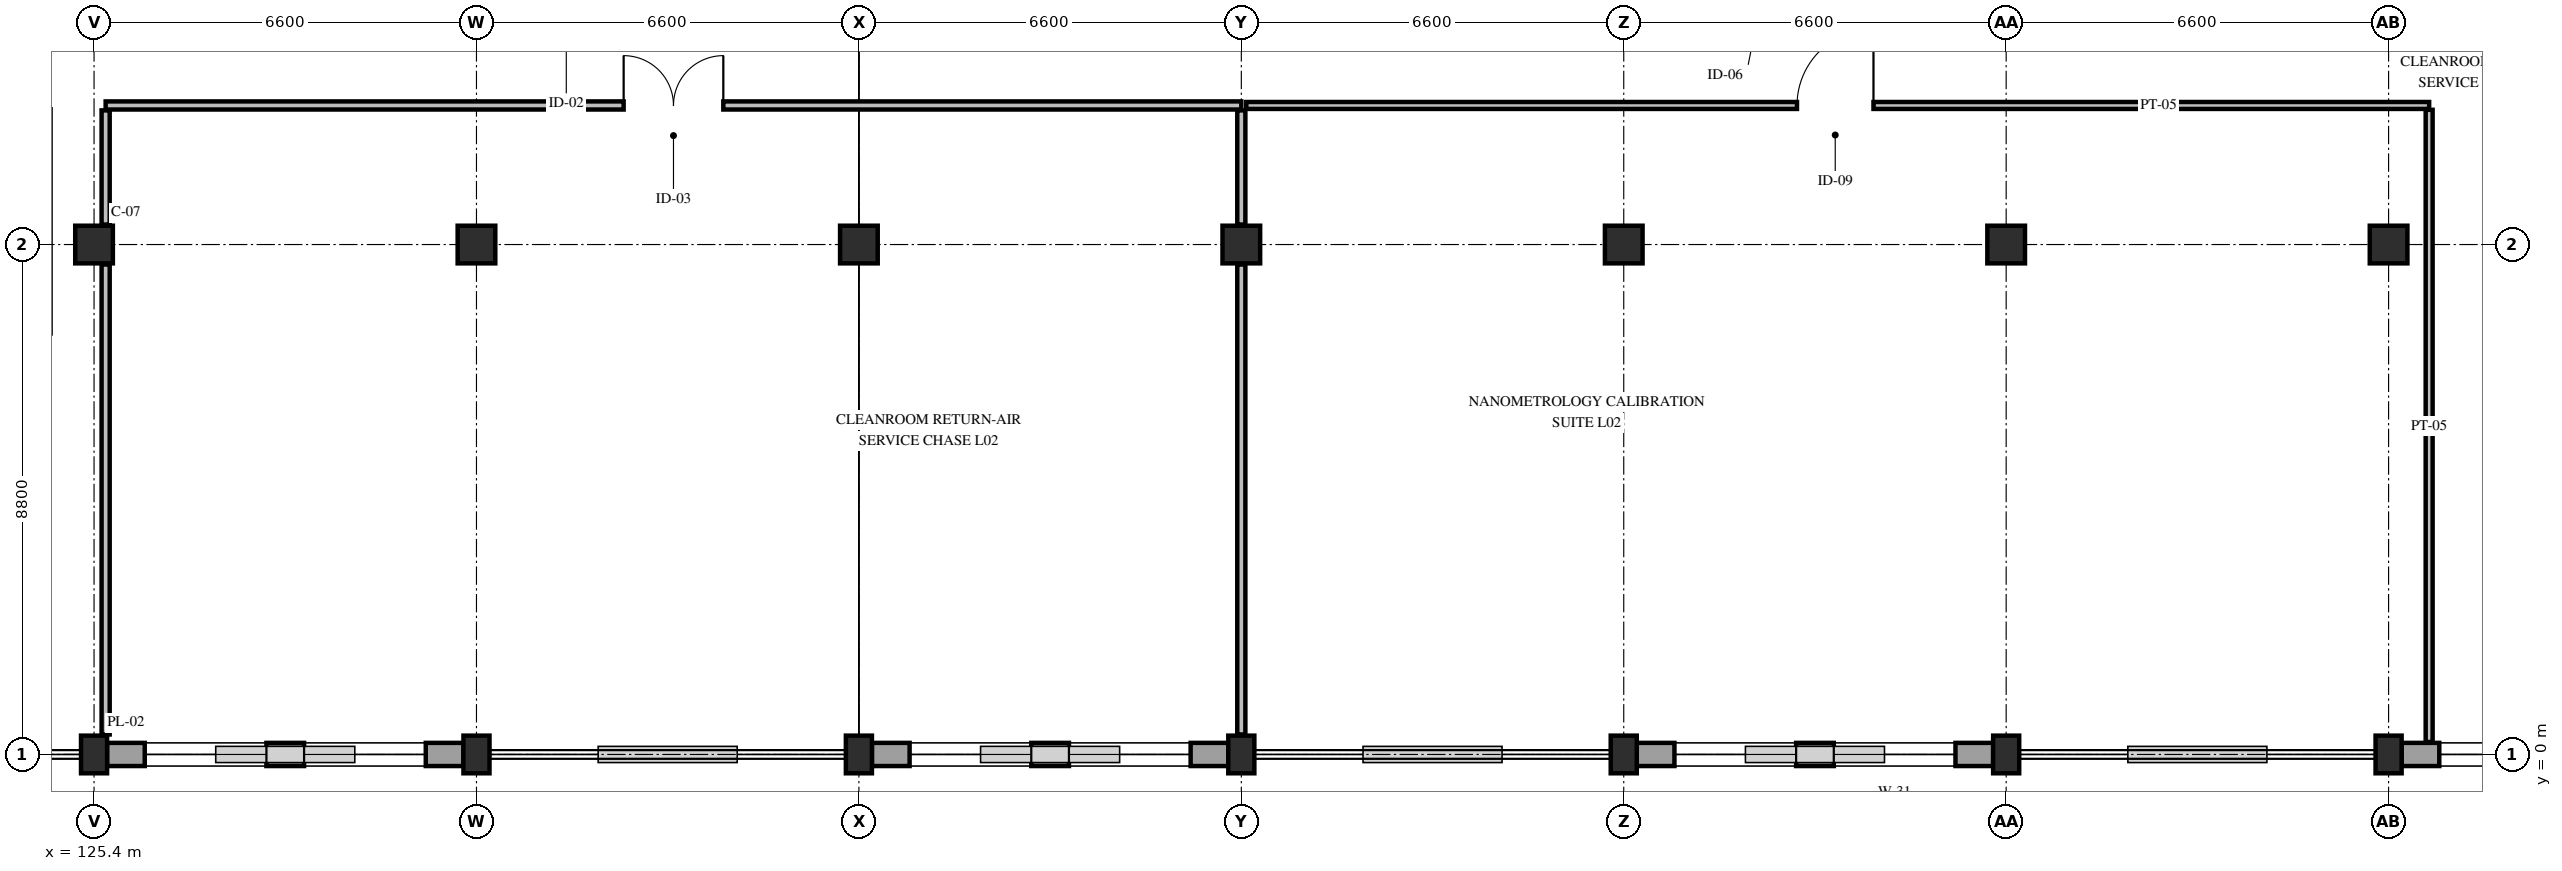
"""IFC4 building model, lengths in metres.
Left out: names, types, materials, properties, quantities, classifications, styles, units other than length and angle.
Written with IfcOpenShell. Run it as: python <this file> out.ifc"""

import sys

from ifc_helpers import new_model, si_unit, direction, frame, frame_2d, origin, origin_2d, place, context, subcontext, project, spatial, rectangle, extrude, element, fill, save


model = new_model("IFC4")
c1 = context("Model", 3, precision=1e-05, world=origin(), true_north=direction((0.0, 1.0)))
c2 = subcontext(c1, "Body", "Model", "MODEL_VIEW")
j1 = project(units=[si_unit("LENGTHUNIT", "METRE"), si_unit("PLANEANGLEUNIT", "RADIAN")], contexts=[c1])
p1 = place(None, origin())
s1 = spatial("IfcSite", under=j1, at=p1, CompositionType="ELEMENT")
p2 = place(p1, origin())
s2 = spatial("IfcBuilding", under=s1, at=p2, CompositionType="ELEMENT")
p3 = place(p2, frame((0.0, 0.0, 10.2)))
s3 = spatial("IfcBuildingStorey", under=s2, at=p3, CompositionType="ELEMENT", Elevation=10.2)
p4 = place(p3, frame((125.4, 0.0, 0.0), z_axis=(0.0, 0.0, 1.0), x_axis=(1.0, 0.0, 0.0)))
e1 = element("IfcColumn", 1, at=p4, inside=s3, PredefinedType="PILASTER", context=c2, shape_type="SweptSolid", body=[
    extrude(rectangle(XDim=0.45, YDim=0.65, at=origin_2d()), origin(), (0.0, 0.0, 1.0), 4.8),
])
p5 = place(p3, frame((125.4, 8.8, 0.0), z_axis=(0.0, 0.0, 1.0), x_axis=(1.0, 0.0, 0.0)))
e2 = element("IfcColumn", 2, at=p5, inside=s3, PredefinedType="COLUMN", context=c2, shape_type="SweptSolid", body=[
    extrude(rectangle(XDim=0.65, YDim=0.65, at=origin_2d()), origin(), (0.0, 0.0, 1.0), 4.8),
])
p6 = place(p3, frame((132.0, 0.0, 0.0), z_axis=(0.0, 0.0, 1.0), x_axis=(1.0, 0.0, 0.0)))
e3 = element("IfcColumn", 3, at=p6, inside=s3, PredefinedType="PILASTER", context=c2, shape_type="SweptSolid", body=[
    extrude(rectangle(XDim=0.45, YDim=0.65, at=origin_2d()), origin(), (0.0, 0.0, 1.0), 4.8),
])
p7 = place(p3, frame((132.0, 8.8, 0.0), z_axis=(0.0, 0.0, 1.0), x_axis=(1.0, 0.0, 0.0)))
e4 = element("IfcColumn", 4, at=p7, inside=s3, PredefinedType="COLUMN", context=c2, shape_type="SweptSolid", body=[
    extrude(rectangle(XDim=0.65, YDim=0.65, at=origin_2d()), origin(), (0.0, 0.0, 1.0), 4.8),
])
p8 = place(p3, frame((138.6, 0.0, 0.0), z_axis=(0.0, 0.0, 1.0), x_axis=(1.0, 0.0, 0.0)))
e5 = element("IfcColumn", 5, at=p8, inside=s3, PredefinedType="PILASTER", context=c2, shape_type="SweptSolid", body=[
    extrude(rectangle(XDim=0.45, YDim=0.65, at=origin_2d()), origin(), (0.0, 0.0, 1.0), 4.8),
])
p9 = place(p3, frame((138.6, 8.8, 0.0), z_axis=(0.0, 0.0, 1.0), x_axis=(1.0, 0.0, 0.0)))
e6 = element("IfcColumn", 6, at=p9, inside=s3, PredefinedType="COLUMN", context=c2, shape_type="SweptSolid", body=[
    extrude(rectangle(XDim=0.65, YDim=0.65, at=origin_2d()), origin(), (0.0, 0.0, 1.0), 4.8),
])
p10 = place(p3, frame((145.2, 0.0, 0.0), z_axis=(0.0, 0.0, 1.0), x_axis=(1.0, 0.0, 0.0)))
e7 = element("IfcColumn", 7, at=p10, inside=s3, PredefinedType="PILASTER", context=c2, shape_type="SweptSolid", body=[
    extrude(rectangle(XDim=0.45, YDim=0.65, at=origin_2d()), origin(), (0.0, 0.0, 1.0), 4.8),
])
p11 = place(p3, frame((145.2, 8.8, 0.0), z_axis=(0.0, 0.0, 1.0), x_axis=(1.0, 0.0, 0.0)))
e8 = element("IfcColumn", 8, at=p11, inside=s3, PredefinedType="COLUMN", context=c2, shape_type="SweptSolid", body=[
    extrude(rectangle(XDim=0.65, YDim=0.65, at=origin_2d()), origin(), (0.0, 0.0, 1.0), 4.8),
])
p12 = place(p3, frame((151.8, 0.0, 0.0), z_axis=(0.0, 0.0, 1.0), x_axis=(1.0, 0.0, 0.0)))
e9 = element("IfcColumn", 9, at=p12, inside=s3, PredefinedType="PILASTER", context=c2, shape_type="SweptSolid", body=[
    extrude(rectangle(XDim=0.45, YDim=0.65, at=origin_2d()), origin(), (0.0, 0.0, 1.0), 4.8),
])
p13 = place(p3, frame((151.8, 8.8, 0.0), z_axis=(0.0, 0.0, 1.0), x_axis=(1.0, 0.0, 0.0)))
e10 = element("IfcColumn", 10, at=p13, inside=s3, PredefinedType="COLUMN", context=c2, shape_type="SweptSolid", body=[
    extrude(rectangle(XDim=0.65, YDim=0.65, at=origin_2d()), origin(), (0.0, 0.0, 1.0), 4.8),
])
p14 = place(p3, frame((158.4, 0.0, 0.0), z_axis=(0.0, 0.0, 1.0), x_axis=(1.0, 0.0, 0.0)))
e11 = element("IfcColumn", 11, at=p14, inside=s3, PredefinedType="PILASTER", context=c2, shape_type="SweptSolid", body=[
    extrude(rectangle(XDim=0.45, YDim=0.65, at=origin_2d()), origin(), (0.0, 0.0, 1.0), 4.8),
])
p15 = place(p3, frame((158.4, 8.8, 0.0), z_axis=(0.0, 0.0, 1.0), x_axis=(1.0, 0.0, 0.0)))
e12 = element("IfcColumn", 12, at=p15, inside=s3, PredefinedType="COLUMN", context=c2, shape_type="SweptSolid", body=[
    extrude(rectangle(XDim=0.65, YDim=0.65, at=origin_2d()), origin(), (0.0, 0.0, 1.0), 4.8),
])
p16 = place(p3, frame((165.0, 0.0, 0.0), z_axis=(0.0, 0.0, 1.0), x_axis=(1.0, 0.0, 0.0)))
e13 = element("IfcColumn", 13, at=p16, inside=s3, PredefinedType="PILASTER", context=c2, shape_type="SweptSolid", body=[
    extrude(rectangle(XDim=0.45, YDim=0.65, at=origin_2d()), origin(), (0.0, 0.0, 1.0), 4.8),
])
p17 = place(p3, frame((165.0, 8.8, 0.0), z_axis=(0.0, 0.0, 1.0), x_axis=(1.0, 0.0, 0.0)))
e14 = element("IfcColumn", 14, at=p17, inside=s3, PredefinedType="COLUMN", context=c2, shape_type="SweptSolid", body=[
    extrude(rectangle(XDim=0.65, YDim=0.65, at=origin_2d()), origin(), (0.0, 0.0, 1.0), 4.8),
])
p18 = place(p3, frame((171.375, 0.0, 0.0), z_axis=(0.0, 0.0, 1.0), x_axis=(-1.0, 0.0, 0.0)))
e15 = element("IfcWall", 15, at=p18, inside=s3, PredefinedType="STANDARD", context=c2, shape_type="SweptSolid", body=[
    extrude(rectangle(XDim=6.15, YDim=0.4, at=frame_2d((3.075, 0.0))), origin(), (0.0, 0.0, 1.0), 3.98),
])
p19 = place(p18, frame((0.65, 0.0, 0.85)))
e16 = element("IfcOpeningElement", 16, at=p19, cuts=e15, PredefinedType="OPENING", context=c2, shape_type="SweptSolid", body=[
    extrude(rectangle(XDim=2.1, YDim=2.04, at=frame_2d((1.05, 1.02))), frame((0.0, 0.215, 0.0), z_axis=(0.0, -1.0, 0.0), x_axis=(1.0, 0.0, 0.0)), (0.0, 0.0, 1.0), 0.43),
])
p20 = place(p18, frame((3.4, 0.0, 0.85)))
e17 = element("IfcOpeningElement", 17, at=p20, cuts=e15, PredefinedType="OPENING", context=c2, shape_type="SweptSolid", body=[
    extrude(rectangle(XDim=2.1, YDim=2.04, at=frame_2d((1.05, 1.02))), frame((0.0, 0.215, 0.0), z_axis=(0.0, -1.0, 0.0), x_axis=(1.0, 0.0, 0.0)), (0.0, 0.0, 1.0), 0.43),
])
p21 = place(p3, frame((158.175, 0.0, 0.0), z_axis=(0.0, 0.0, 1.0), x_axis=(-1.0, 0.0, 0.0)))
e18 = element("IfcWall", 18, at=p21, inside=s3, PredefinedType="STANDARD", context=c2, shape_type="SweptSolid", body=[
    extrude(rectangle(XDim=6.15, YDim=0.4, at=frame_2d((3.075, 0.0))), origin(), (0.0, 0.0, 1.0), 3.98),
])
p22 = place(p21, frame((0.65, 0.0, 0.85)))
e19 = element("IfcOpeningElement", 19, at=p22, cuts=e18, PredefinedType="OPENING", context=c2, shape_type="SweptSolid", body=[
    extrude(rectangle(XDim=2.1, YDim=2.04, at=frame_2d((1.05, 1.02))), frame((0.0, 0.215, 0.0), z_axis=(0.0, -1.0, 0.0), x_axis=(1.0, 0.0, 0.0)), (0.0, 0.0, 1.0), 0.43),
])
p23 = place(p21, frame((3.4, 0.0, 0.85)))
e20 = element("IfcOpeningElement", 20, at=p23, cuts=e18, PredefinedType="OPENING", context=c2, shape_type="SweptSolid", body=[
    extrude(rectangle(XDim=2.1, YDim=2.04, at=frame_2d((1.05, 1.02))), frame((0.0, 0.215, 0.0), z_axis=(0.0, -1.0, 0.0), x_axis=(1.0, 0.0, 0.0)), (0.0, 0.0, 1.0), 0.43),
])
p24 = place(p3, frame((144.975, 0.0, 0.0), z_axis=(0.0, 0.0, 1.0), x_axis=(-1.0, 0.0, 0.0)))
e21 = element("IfcWall", 21, at=p24, inside=s3, PredefinedType="STANDARD", context=c2, shape_type="SweptSolid", body=[
    extrude(rectangle(XDim=6.15, YDim=0.4, at=frame_2d((3.075, 0.0))), origin(), (0.0, 0.0, 1.0), 3.98),
])
p25 = place(p24, frame((0.65, 0.0, 0.85)))
e22 = element("IfcOpeningElement", 22, at=p25, cuts=e21, PredefinedType="OPENING", context=c2, shape_type="SweptSolid", body=[
    extrude(rectangle(XDim=2.1, YDim=2.04, at=frame_2d((1.05, 1.02))), frame((0.0, 0.215, 0.0), z_axis=(0.0, -1.0, 0.0), x_axis=(1.0, 0.0, 0.0)), (0.0, 0.0, 1.0), 0.43),
])
p26 = place(p24, frame((3.4, 0.0, 0.85)))
e23 = element("IfcOpeningElement", 23, at=p26, cuts=e21, PredefinedType="OPENING", context=c2, shape_type="SweptSolid", body=[
    extrude(rectangle(XDim=2.1, YDim=2.04, at=frame_2d((1.05, 1.02))), frame((0.0, 0.215, 0.0), z_axis=(0.0, -1.0, 0.0), x_axis=(1.0, 0.0, 0.0)), (0.0, 0.0, 1.0), 0.43),
])
p27 = place(p3, frame((131.775, 0.0, 0.0), z_axis=(0.0, 0.0, 1.0), x_axis=(-1.0, 0.0, 0.0)))
e24 = element("IfcWall", 24, at=p27, inside=s3, PredefinedType="STANDARD", context=c2, shape_type="SweptSolid", body=[
    extrude(rectangle(XDim=6.15, YDim=0.4, at=frame_2d((3.075, 0.0))), origin(), (0.0, 0.0, 1.0), 3.98),
])
p28 = place(p27, frame((0.65, 0.0, 0.85)))
e25 = element("IfcOpeningElement", 25, at=p28, cuts=e24, PredefinedType="OPENING", context=c2, shape_type="SweptSolid", body=[
    extrude(rectangle(XDim=2.1, YDim=2.04, at=frame_2d((1.05, 1.02))), frame((0.0, 0.215, 0.0), z_axis=(0.0, -1.0, 0.0), x_axis=(1.0, 0.0, 0.0)), (0.0, 0.0, 1.0), 0.43),
])
p29 = place(p27, frame((3.4, 0.0, 0.85)))
e26 = element("IfcOpeningElement", 26, at=p29, cuts=e24, PredefinedType="OPENING", context=c2, shape_type="SweptSolid", body=[
    extrude(rectangle(XDim=2.1, YDim=2.04, at=frame_2d((1.05, 1.02))), frame((0.0, 0.215, 0.0), z_axis=(0.0, -1.0, 0.0), x_axis=(1.0, 0.0, 0.0)), (0.0, 0.0, 1.0), 0.43),
])
p30 = place(p3, frame((125.6, 11.2, 0.0), z_axis=(0.0, 0.0, 1.0), x_axis=(1.0, 0.0, 0.0)))
e27 = element("IfcWall", 27, at=p30, inside=s3, PredefinedType="PARTITIONING", context=c2, shape_type="SweptSolid", body=[
    extrude(rectangle(XDim=19.6, YDim=0.14, at=frame_2d((9.8, 0.0))), origin(), (0.0, 0.0, 1.0), 4.065),
])
p31 = place(p30, frame((8.94, 0.0, 0.0)))
e28 = element("IfcOpeningElement", 28, at=p31, cuts=e27, PredefinedType="OPENING", context=c2, shape_type="SweptSolid", body=[
    extrude(rectangle(XDim=1.72, YDim=2.35, at=frame_2d((0.86, 1.175))), frame((0.0, 0.085, 0.0), z_axis=(0.0, -1.0, 0.0), x_axis=(1.0, 0.0, 0.0)), (0.0, 0.0, 1.0), 0.17),
])
p32 = place(p3, frame((125.6, 0.345, 0.0), z_axis=(0.0, 0.0, 1.0), x_axis=(0.0, 1.0, 0.0)))
e29 = element("IfcWall", 29, at=p32, inside=s3, PredefinedType="PARTITIONING", context=c2, shape_type="SweptSolid", body=[
    extrude(rectangle(XDim=8.11, YDim=0.14, at=frame_2d((4.055, 0.0))), origin(), (0.0, 0.0, 1.0), 4.065),
])
p33 = place(p3, frame((125.6, 9.145, 0.0), z_axis=(0.0, 0.0, 1.0), x_axis=(0.0, 1.0, 0.0)))
e30 = element("IfcWall", 30, at=p33, inside=s3, PredefinedType="PARTITIONING", context=c2, shape_type="SweptSolid", body=[
    extrude(rectangle(XDim=1.97, YDim=0.14, at=frame_2d((0.985, 0.0))), origin(), (0.0, 0.0, 1.0), 4.065),
])
p34 = place(p3, frame((145.2, 0.345, 0.0), z_axis=(0.0, 0.0, 1.0), x_axis=(0.0, 1.0, 0.0)))
e31 = element("IfcWall", 31, at=p34, inside=s3, PredefinedType="PARTITIONING", context=c2, shape_type="SweptSolid", body=[
    extrude(rectangle(XDim=8.11, YDim=0.14, at=frame_2d((4.055, 0.0))), origin(), (0.0, 0.0, 1.0), 4.065),
])
p35 = place(p3, frame((145.2, 9.145, 0.0), z_axis=(0.0, 0.0, 1.0), x_axis=(0.0, 1.0, 0.0)))
e32 = element("IfcWall", 32, at=p35, inside=s3, PredefinedType="PARTITIONING", context=c2, shape_type="SweptSolid", body=[
    extrude(rectangle(XDim=1.97, YDim=0.14, at=frame_2d((0.985, 0.0))), origin(), (0.0, 0.0, 1.0), 4.065),
])
p36 = place(p3, frame((145.285, 11.2, 0.0), z_axis=(0.0, 0.0, 1.0), x_axis=(1.0, 0.0, 0.0)))
e33 = element("IfcWall", 33, at=p36, inside=s3, PredefinedType="PARTITIONING", context=c2, shape_type="SweptSolid", body=[
    extrude(rectangle(XDim=20.415, YDim=0.12, at=frame_2d((10.208, 0.0))), origin(), (0.0, 0.0, 1.0), 4.065),
])
p37 = place(p36, frame((9.505, 0.0, 0.0)))
e34 = element("IfcOpeningElement", 34, at=p37, cuts=e33, PredefinedType="OPENING", context=c2, shape_type="SweptSolid", body=[
    extrude(rectangle(XDim=1.32, YDim=2.2, at=frame_2d((0.66, 1.1))), frame((0.0, 0.075, 0.0), z_axis=(0.0, -1.0, 0.0), x_axis=(1.0, 0.0, 0.0)), (0.0, 0.0, 1.0), 0.15),
])
p38 = place(p3, frame((165.7, 0.215, 0.0), z_axis=(0.0, 0.0, 1.0), x_axis=(0.0, 1.0, 0.0)))
e35 = element("IfcWall", 35, at=p38, inside=s3, PredefinedType="PARTITIONING", context=c2, shape_type="SweptSolid", body=[
    extrude(rectangle(XDim=10.91, YDim=0.12, at=frame_2d((5.455, 0.0))), origin(), (0.0, 0.0, 1.0), 3.98),
])
p39 = place(p20, origin())
e36 = element("IfcWindow", 36, at=p39, inside=s3, PartitioningType="DOUBLE_PANEL_VERTICAL", PredefinedType="WINDOW", context=c2, shape_type="SweptSolid", body=[
    extrude(rectangle(XDim=2.1, YDim=2.04, at=frame_2d((1.05, 1.02))), frame((0.0, 0.03, 0.0), z_axis=(0.0, -1.0, 0.0), x_axis=(1.0, 0.0, 0.0)), (0.0, 0.0, 1.0), 0.06),
])
fill(e17, e36)
p40 = place(p22, origin())
e37 = element("IfcWindow", 37, at=p40, inside=s3, PartitioningType="DOUBLE_PANEL_VERTICAL", PredefinedType="WINDOW", context=c2, shape_type="SweptSolid", body=[
    extrude(rectangle(XDim=2.1, YDim=2.04, at=frame_2d((1.05, 1.02))), frame((0.0, 0.03, 0.0), z_axis=(0.0, -1.0, 0.0), x_axis=(1.0, 0.0, 0.0)), (0.0, 0.0, 1.0), 0.06),
])
fill(e19, e37)
p41 = place(p23, origin())
e38 = element("IfcWindow", 38, at=p41, inside=s3, PartitioningType="DOUBLE_PANEL_VERTICAL", PredefinedType="WINDOW", context=c2, shape_type="SweptSolid", body=[
    extrude(rectangle(XDim=2.1, YDim=2.04, at=frame_2d((1.05, 1.02))), frame((0.0, 0.03, 0.0), z_axis=(0.0, -1.0, 0.0), x_axis=(1.0, 0.0, 0.0)), (0.0, 0.0, 1.0), 0.06),
])
fill(e20, e38)
p42 = place(p25, origin())
e39 = element("IfcWindow", 39, at=p42, inside=s3, PartitioningType="DOUBLE_PANEL_VERTICAL", PredefinedType="WINDOW", context=c2, shape_type="SweptSolid", body=[
    extrude(rectangle(XDim=2.1, YDim=2.04, at=frame_2d((1.05, 1.02))), frame((0.0, 0.03, 0.0), z_axis=(0.0, -1.0, 0.0), x_axis=(1.0, 0.0, 0.0)), (0.0, 0.0, 1.0), 0.06),
])
fill(e22, e39)
p43 = place(p26, origin())
e40 = element("IfcWindow", 40, at=p43, inside=s3, PartitioningType="DOUBLE_PANEL_VERTICAL", PredefinedType="WINDOW", context=c2, shape_type="SweptSolid", body=[
    extrude(rectangle(XDim=2.1, YDim=2.04, at=frame_2d((1.05, 1.02))), frame((0.0, 0.03, 0.0), z_axis=(0.0, -1.0, 0.0), x_axis=(1.0, 0.0, 0.0)), (0.0, 0.0, 1.0), 0.06),
])
fill(e23, e40)
p44 = place(p28, origin())
e41 = element("IfcWindow", 41, at=p44, inside=s3, PartitioningType="DOUBLE_PANEL_VERTICAL", PredefinedType="WINDOW", context=c2, shape_type="SweptSolid", body=[
    extrude(rectangle(XDim=2.1, YDim=2.04, at=frame_2d((1.05, 1.02))), frame((0.0, 0.03, 0.0), z_axis=(0.0, -1.0, 0.0), x_axis=(1.0, 0.0, 0.0)), (0.0, 0.0, 1.0), 0.06),
])
fill(e25, e41)
p45 = place(p29, origin())
e42 = element("IfcWindow", 42, at=p45, inside=s3, PartitioningType="DOUBLE_PANEL_VERTICAL", PredefinedType="WINDOW", context=c2, shape_type="SweptSolid", body=[
    extrude(rectangle(XDim=2.1, YDim=2.04, at=frame_2d((1.05, 1.02))), frame((0.0, 0.03, 0.0), z_axis=(0.0, -1.0, 0.0), x_axis=(1.0, 0.0, 0.0)), (0.0, 0.0, 1.0), 0.06),
])
fill(e26, e42)
p46 = place(p31, origin())
e43 = element("IfcDoor", 43, at=p46, inside=s3, OperationType="DOUBLE_DOOR_SINGLE_SWING", PredefinedType="DOOR", context=c2, shape_type="SweptSolid", body=[
    extrude(rectangle(XDim=1.72, YDim=2.35, at=frame_2d((0.86, 1.175))), frame((0.0, 0.025, 0.0), z_axis=(0.0, -1.0, 0.0), x_axis=(1.0, 0.0, 0.0)), (0.0, 0.0, 1.0), 0.05),
])
fill(e28, e43)
p47 = place(p37, origin())
e44 = element("IfcDoor", 44, at=p47, inside=s3, OperationType="SINGLE_SWING_RIGHT", PredefinedType="DOOR", context=c2, shape_type="SweptSolid", body=[
    extrude(rectangle(XDim=1.32, YDim=2.2, at=frame_2d((0.66, 1.1))), frame((0.0, 0.025, 0.0), z_axis=(0.0, -1.0, 0.0), x_axis=(1.0, 0.0, 0.0)), (0.0, 0.0, 1.0), 0.05),
])
fill(e34, e44)
save(model, sys.argv[1])
